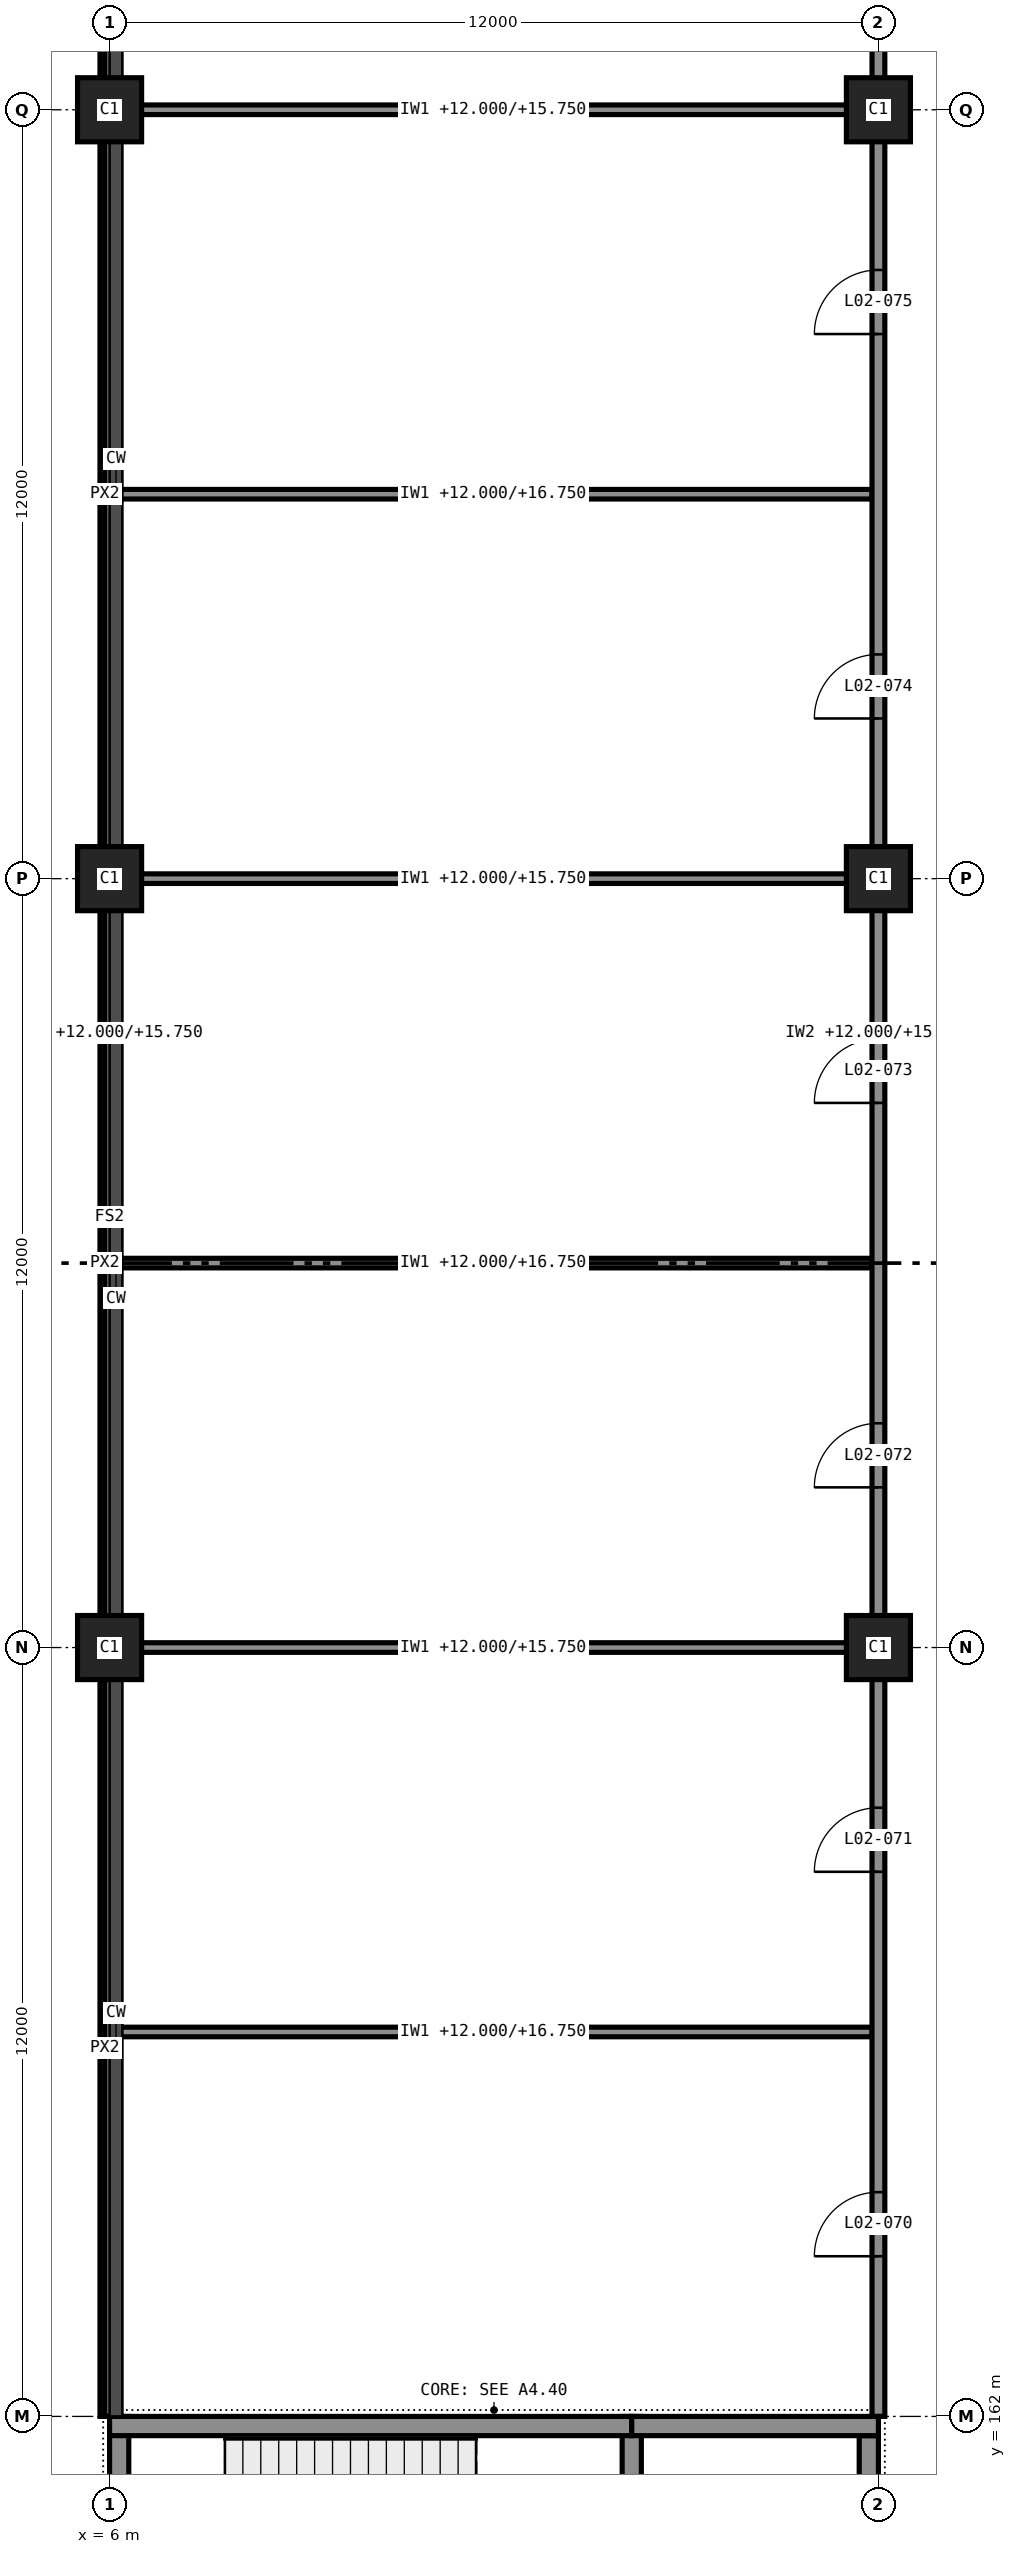
"""IFC4 building model, lengths in metres.
Left out: names, types, materials, properties, quantities, classifications, styles, units other than length and angle.
Written with IfcOpenShell. Run it as: python <this file> out.ifc"""

import sys

from ifc_helpers import new_model, si_unit, direction, frame, frame_2d, origin, origin_2d, place, context, subcontext, project, spatial, rectangle, extrude, element, fill, save


model = new_model("IFC4")
c1 = context("Model", 3, precision=1e-05, world=origin(), true_north=direction((0.0, 1.0)))
c2 = subcontext(c1, "Body", "Model", "MODEL_VIEW")
j1 = project(units=[si_unit("LENGTHUNIT", "METRE"), si_unit("PLANEANGLEUNIT", "RADIAN")], contexts=[c1])
p1 = place(None, origin())
s1 = spatial("IfcSite", under=j1, at=p1, CompositionType="ELEMENT")
p2 = place(p1, origin())
s2 = spatial("IfcBuilding", under=s1, at=p2, CompositionType="ELEMENT")
p3 = place(p2, frame((0.0, 0.0, 12.0)))
s3 = spatial("IfcBuildingStorey", under=s2, at=p3, CompositionType="ELEMENT", Elevation=12.0)
for number, where, z_axis, x_axis in (
    (1, (6.0, 174.0, 0.0), (0.0, 0.0, 1.0), (1.0, 0.0, 0.0)),
    (2, (6.0, 186.0, 0.0), (0.0, 0.0, 1.0), (1.0, 0.0, 0.0)),
    (3, (6.0, 198.0, 0.0), (0.0, 0.0, 1.0), (1.0, 0.0, 0.0)),
    (4, (18.0, 174.0, 0.0), (0.0, 0.0, 1.0), (1.0, 0.0, 0.0)),
    (5, (18.0, 186.0, 0.0), (0.0, 0.0, 1.0), (1.0, 0.0, 0.0)),
    (6, (18.0, 198.0, 0.0), (0.0, 0.0, 1.0), (1.0, 0.0, 0.0)),
):
    element("IfcColumn", number, at=place(p3, frame(where, z_axis=z_axis, x_axis=x_axis)), inside=s3, PredefinedType="COLUMN", context=c2, shape_type="SweptSolid", body=[
        extrude(rectangle(XDim=1.0, YDim=1.0, at=origin_2d()), origin(), (0.0, 0.0, 1.0), 5.0),
    ])
p4 = place(p3, frame((6.0, 161.85, 0.0), z_axis=(0.0, 0.0, 1.0), x_axis=(1.0, 0.0, 0.0)))
e7 = element("IfcWall", 7, at=p4, inside=s3, PredefinedType="SHEAR", context=c2, shape_type="SweptSolid", body=[
    extrude(rectangle(XDim=8.15, YDim=0.3, at=frame_2d((4.075, 0.0))), origin(), (0.0, 0.0, 1.0), 4.75),
])
p5 = place(p3, frame((14.15, 161.85, 0.0), z_axis=(0.0, 0.0, 1.0), x_axis=(1.0, 0.0, 0.0)))
e8 = element("IfcWall", 8, at=p5, inside=s3, PredefinedType="SHEAR", context=c2, shape_type="SweptSolid", body=[
    extrude(rectangle(XDim=3.85, YDim=0.3, at=frame_2d((1.925, 0.0))), origin(), (0.0, 0.0, 1.0), 4.75),
])
p6 = place(p3, frame((6.15, 158.55, 0.0), z_axis=(0.0, 0.0, 1.0), x_axis=(0.0, 1.0, 0.0)))
e9 = element("IfcWall", 9, at=p6, inside=s3, PredefinedType="SHEAR", context=c2, shape_type="SweptSolid", body=[
    extrude(rectangle(XDim=3.45, YDim=0.3, at=frame_2d((1.725, 0.0))), origin(), (0.0, 0.0, 1.0), 4.75),
])
p7 = place(p3, frame((17.85, 158.55, 0.0), z_axis=(0.0, 0.0, 1.0), x_axis=(0.0, 1.0, 0.0)))
e10 = element("IfcWall", 10, at=p7, inside=s3, PredefinedType="SHEAR", context=c2, shape_type="SweptSolid", body=[
    extrude(rectangle(XDim=3.15, YDim=0.3, at=frame_2d((1.575, 0.0))), origin(), (0.0, 0.0, 1.0), 4.75),
])
p8 = place(p7, frame((1.15, 0.0, 0.0)))
e11 = element("IfcOpeningElement", 11, at=p8, cuts=e10, PredefinedType="OPENING", context=c2, shape_type="SweptSolid", body=[
    extrude(rectangle(XDim=1.0, YDim=2.1, at=frame_2d((0.5, 1.05))), frame((0.0, 0.16, 0.0), z_axis=(0.0, -1.0, 0.0), x_axis=(1.0, 0.0, 0.0)), (0.0, 0.0, 1.0), 0.32),
])
p9 = place(p3, frame((14.15, 158.7, 0.0), z_axis=(0.0, 0.0, 1.0), x_axis=(0.0, 1.0, 0.0)))
e12 = element("IfcWall", 12, at=p9, inside=s3, PredefinedType="SHEAR", context=c2, shape_type="SweptSolid", body=[
    extrude(rectangle(XDim=3.3, YDim=0.3, at=frame_2d((1.65, 0.0))), origin(), (0.0, 0.0, 1.0), 4.75),
])
p10 = place(p3, frame((5.925, 210.0, 4.75), z_axis=(0.0, 0.0, 1.0), x_axis=(0.0, -1.0, 0.0)))
e13 = element("IfcWall", 13, at=p10, inside=s3, PredefinedType="STANDARD", context=c2, shape_type="SweptSolid", body=[
    extrude(rectangle(XDim=11.5, YDim=0.15, at=frame_2d((5.75, 0.0))), origin(), (0.0, 0.0, 1.0), 0.25),
])
for number, where, z_axis, x_axis in (
    (14, (5.925, 197.5, 4.75), (0.0, 0.0, 1.0), (0.0, -1.0, 0.0)),
    (15, (5.925, 185.5, 4.75), (0.0, 0.0, 1.0), (0.0, -1.0, 0.0)),
):
    element("IfcWall", number, at=place(p3, frame(where, z_axis=z_axis, x_axis=x_axis)), inside=s3, PredefinedType="STANDARD", context=c2, shape_type="SweptSolid", body=[
        extrude(rectangle(XDim=11.0, YDim=0.15, at=frame_2d((5.5, 0.0))), origin(), (0.0, 0.0, 1.0), 0.25),
    ])
p11 = place(p3, frame((5.925, 173.5, 4.75), z_axis=(0.0, 0.0, 1.0), x_axis=(0.0, -1.0, 0.0)))
e16 = element("IfcWall", 16, at=p11, inside=s3, PredefinedType="STANDARD", context=c2, shape_type="SweptSolid", body=[
    extrude(rectangle(XDim=11.5, YDim=0.15, at=frame_2d((5.75, 0.0))), origin(), (0.0, 0.0, 1.0), 0.25),
])
p12 = place(p3, frame((6.075, 168.0, 0.0), z_axis=(0.0, 0.0, 1.0), x_axis=(1.0, 0.0, 0.0)))
e17 = element("IfcWall", 17, at=p12, inside=s3, PredefinedType="PARTITIONING", context=c2, shape_type="SweptSolid", body=[
    extrude(rectangle(XDim=11.825, YDim=0.15, at=frame_2d((5.913, 0.0))), origin(), (0.0, 0.0, 1.0), 4.75),
])
p13 = place(p3, frame((6.075, 174.0, 0.0), z_axis=(0.0, 0.0, 1.0), x_axis=(1.0, 0.0, 0.0)))
e18 = element("IfcWall", 18, at=p13, inside=s3, PredefinedType="PARTITIONING", context=c2, shape_type="SweptSolid", body=[
    extrude(rectangle(XDim=11.825, YDim=0.15, at=frame_2d((5.913, 0.0))), origin(), (0.0, 0.0, 1.0), 3.75),
])
p14 = place(p3, frame((6.075, 180.0, 0.0), z_axis=(0.0, 0.0, 1.0), x_axis=(1.0, 0.0, 0.0)))
e19 = element("IfcWall", 19, at=p14, inside=s3, PredefinedType="PARTITIONING", context=c2, shape_type="SweptSolid", body=[
    extrude(rectangle(XDim=11.825, YDim=0.15, at=frame_2d((5.913, 0.0))), origin(), (0.0, 0.0, 1.0), 4.75),
])
p15 = place(p3, frame((6.075, 186.0, 0.0), z_axis=(0.0, 0.0, 1.0), x_axis=(1.0, 0.0, 0.0)))
e20 = element("IfcWall", 20, at=p15, inside=s3, PredefinedType="PARTITIONING", context=c2, shape_type="SweptSolid", body=[
    extrude(rectangle(XDim=11.825, YDim=0.15, at=frame_2d((5.913, 0.0))), origin(), (0.0, 0.0, 1.0), 3.75),
])
p16 = place(p3, frame((6.075, 192.0, 0.0), z_axis=(0.0, 0.0, 1.0), x_axis=(1.0, 0.0, 0.0)))
e21 = element("IfcWall", 21, at=p16, inside=s3, PredefinedType="PARTITIONING", context=c2, shape_type="SweptSolid", body=[
    extrude(rectangle(XDim=11.825, YDim=0.15, at=frame_2d((5.913, 0.0))), origin(), (0.0, 0.0, 1.0), 4.75),
])
p17 = place(p3, frame((6.075, 198.0, 0.0), z_axis=(0.0, 0.0, 1.0), x_axis=(1.0, 0.0, 0.0)))
e22 = element("IfcWall", 22, at=p17, inside=s3, PredefinedType="PARTITIONING", context=c2, shape_type="SweptSolid", body=[
    extrude(rectangle(XDim=11.825, YDim=0.15, at=frame_2d((5.913, 0.0))), origin(), (0.0, 0.0, 1.0), 3.75),
])
p18 = place(p3, frame((6.0, 162.0, 0.0), z_axis=(0.0, 0.0, 1.0), x_axis=(0.0, 1.0, 0.0)))
e23 = element("IfcWall", 23, at=p18, inside=s3, PredefinedType="PARTITIONING", context=c2, shape_type="SweptSolid", body=[
    extrude(rectangle(XDim=48.0, YDim=0.15, at=frame_2d((24.0, 0.0))), origin(), (0.0, 0.0, 1.0), 3.75),
])
p19 = place(p3, frame((18.0, 162.0, 0.0), z_axis=(0.0, 0.0, 1.0), x_axis=(0.0, 1.0, 0.0)))
e24 = element("IfcWall", 24, at=p19, inside=s3, PredefinedType="PARTITIONING", context=c2, shape_type="SweptSolid", body=[
    extrude(rectangle(XDim=48.0, YDim=0.2, at=frame_2d((24.0, 0.0))), origin(), (0.0, 0.0, 1.0), 3.75),
])
p20 = place(p19, frame((2.5, 0.0, 0.0)))
e25 = element("IfcOpeningElement", 25, at=p20, cuts=e24, PredefinedType="OPENING", context=c2, shape_type="SweptSolid", body=[
    extrude(rectangle(XDim=1.0, YDim=2.1, at=frame_2d((0.5, 1.05))), frame((0.0, 0.11, 0.0), z_axis=(0.0, -1.0, 0.0), x_axis=(1.0, 0.0, 0.0)), (0.0, 0.0, 1.0), 0.22),
])
p21 = place(p19, frame((8.5, 0.0, 0.0)))
e26 = element("IfcOpeningElement", 26, at=p21, cuts=e24, PredefinedType="OPENING", context=c2, shape_type="SweptSolid", body=[
    extrude(rectangle(XDim=1.0, YDim=2.1, at=frame_2d((0.5, 1.05))), frame((0.0, 0.11, 0.0), z_axis=(0.0, -1.0, 0.0), x_axis=(1.0, 0.0, 0.0)), (0.0, 0.0, 1.0), 0.22),
])
p22 = place(p19, frame((14.5, 0.0, 0.0)))
e27 = element("IfcOpeningElement", 27, at=p22, cuts=e24, PredefinedType="OPENING", context=c2, shape_type="SweptSolid", body=[
    extrude(rectangle(XDim=1.0, YDim=2.1, at=frame_2d((0.5, 1.05))), frame((0.0, 0.11, 0.0), z_axis=(0.0, -1.0, 0.0), x_axis=(1.0, 0.0, 0.0)), (0.0, 0.0, 1.0), 0.22),
])
p23 = place(p19, frame((20.5, 0.0, 0.0)))
e28 = element("IfcOpeningElement", 28, at=p23, cuts=e24, PredefinedType="OPENING", context=c2, shape_type="SweptSolid", body=[
    extrude(rectangle(XDim=1.0, YDim=2.1, at=frame_2d((0.5, 1.05))), frame((0.0, 0.11, 0.0), z_axis=(0.0, -1.0, 0.0), x_axis=(1.0, 0.0, 0.0)), (0.0, 0.0, 1.0), 0.22),
])
p24 = place(p19, frame((26.5, 0.0, 0.0)))
e29 = element("IfcOpeningElement", 29, at=p24, cuts=e24, PredefinedType="OPENING", context=c2, shape_type="SweptSolid", body=[
    extrude(rectangle(XDim=1.0, YDim=2.1, at=frame_2d((0.5, 1.05))), frame((0.0, 0.11, 0.0), z_axis=(0.0, -1.0, 0.0), x_axis=(1.0, 0.0, 0.0)), (0.0, 0.0, 1.0), 0.22),
])
p25 = place(p19, frame((32.5, 0.0, 0.0)))
e30 = element("IfcOpeningElement", 30, at=p25, cuts=e24, PredefinedType="OPENING", context=c2, shape_type="SweptSolid", body=[
    extrude(rectangle(XDim=1.0, YDim=2.1, at=frame_2d((0.5, 1.05))), frame((0.0, 0.11, 0.0), z_axis=(0.0, -1.0, 0.0), x_axis=(1.0, 0.0, 0.0)), (0.0, 0.0, 1.0), 0.22),
])
p26 = place(p19, frame((38.5, 0.0, 0.0)))
e31 = element("IfcOpeningElement", 31, at=p26, cuts=e24, PredefinedType="OPENING", context=c2, shape_type="SweptSolid", body=[
    extrude(rectangle(XDim=1.0, YDim=2.1, at=frame_2d((0.5, 1.05))), frame((0.0, 0.11, 0.0), z_axis=(0.0, -1.0, 0.0), x_axis=(1.0, 0.0, 0.0)), (0.0, 0.0, 1.0), 0.22),
])
p27 = place(p19, frame((44.5, 0.0, 0.0)))
e32 = element("IfcOpeningElement", 32, at=p27, cuts=e24, PredefinedType="OPENING", context=c2, shape_type="SweptSolid", body=[
    extrude(rectangle(XDim=1.0, YDim=2.1, at=frame_2d((0.5, 1.05))), frame((0.0, 0.11, 0.0), z_axis=(0.0, -1.0, 0.0), x_axis=(1.0, 0.0, 0.0)), (0.0, 0.0, 1.0), 0.22),
])
p28 = place(p20, origin())
e33 = element("IfcDoor", 33, at=p28, inside=s3, OperationType="SINGLE_SWING_RIGHT", PredefinedType="DOOR", context=c2, shape_type="SweptSolid", body=[
    extrude(rectangle(XDim=1.0, YDim=2.1, at=frame_2d((0.5, 1.05))), frame((0.0, 0.025, 0.0), z_axis=(0.0, -1.0, 0.0), x_axis=(1.0, 0.0, 0.0)), (0.0, 0.0, 1.0), 0.05),
])
fill(e25, e33)
p29 = place(p21, origin())
e34 = element("IfcDoor", 34, at=p29, inside=s3, OperationType="SINGLE_SWING_RIGHT", PredefinedType="DOOR", context=c2, shape_type="SweptSolid", body=[
    extrude(rectangle(XDim=1.0, YDim=2.1, at=frame_2d((0.5, 1.05))), frame((0.0, 0.025, 0.0), z_axis=(0.0, -1.0, 0.0), x_axis=(1.0, 0.0, 0.0)), (0.0, 0.0, 1.0), 0.05),
])
fill(e26, e34)
p30 = place(p22, origin())
e35 = element("IfcDoor", 35, at=p30, inside=s3, OperationType="SINGLE_SWING_RIGHT", PredefinedType="DOOR", context=c2, shape_type="SweptSolid", body=[
    extrude(rectangle(XDim=1.0, YDim=2.1, at=frame_2d((0.5, 1.05))), frame((0.0, 0.025, 0.0), z_axis=(0.0, -1.0, 0.0), x_axis=(1.0, 0.0, 0.0)), (0.0, 0.0, 1.0), 0.05),
])
fill(e27, e35)
p31 = place(p23, origin())
e36 = element("IfcDoor", 36, at=p31, inside=s3, OperationType="SINGLE_SWING_RIGHT", PredefinedType="DOOR", context=c2, shape_type="SweptSolid", body=[
    extrude(rectangle(XDim=1.0, YDim=2.1, at=frame_2d((0.5, 1.05))), frame((0.0, 0.025, 0.0), z_axis=(0.0, -1.0, 0.0), x_axis=(1.0, 0.0, 0.0)), (0.0, 0.0, 1.0), 0.05),
])
fill(e28, e36)
p32 = place(p24, origin())
e37 = element("IfcDoor", 37, at=p32, inside=s3, OperationType="SINGLE_SWING_RIGHT", PredefinedType="DOOR", context=c2, shape_type="SweptSolid", body=[
    extrude(rectangle(XDim=1.0, YDim=2.1, at=frame_2d((0.5, 1.05))), frame((0.0, 0.025, 0.0), z_axis=(0.0, -1.0, 0.0), x_axis=(1.0, 0.0, 0.0)), (0.0, 0.0, 1.0), 0.05),
])
fill(e29, e37)
p33 = place(p25, origin())
e38 = element("IfcDoor", 38, at=p33, inside=s3, OperationType="SINGLE_SWING_RIGHT", PredefinedType="DOOR", context=c2, shape_type="SweptSolid", body=[
    extrude(rectangle(XDim=1.0, YDim=2.1, at=frame_2d((0.5, 1.05))), frame((0.0, 0.025, 0.0), z_axis=(0.0, -1.0, 0.0), x_axis=(1.0, 0.0, 0.0)), (0.0, 0.0, 1.0), 0.05),
])
fill(e30, e38)
save(model, sys.argv[1])
